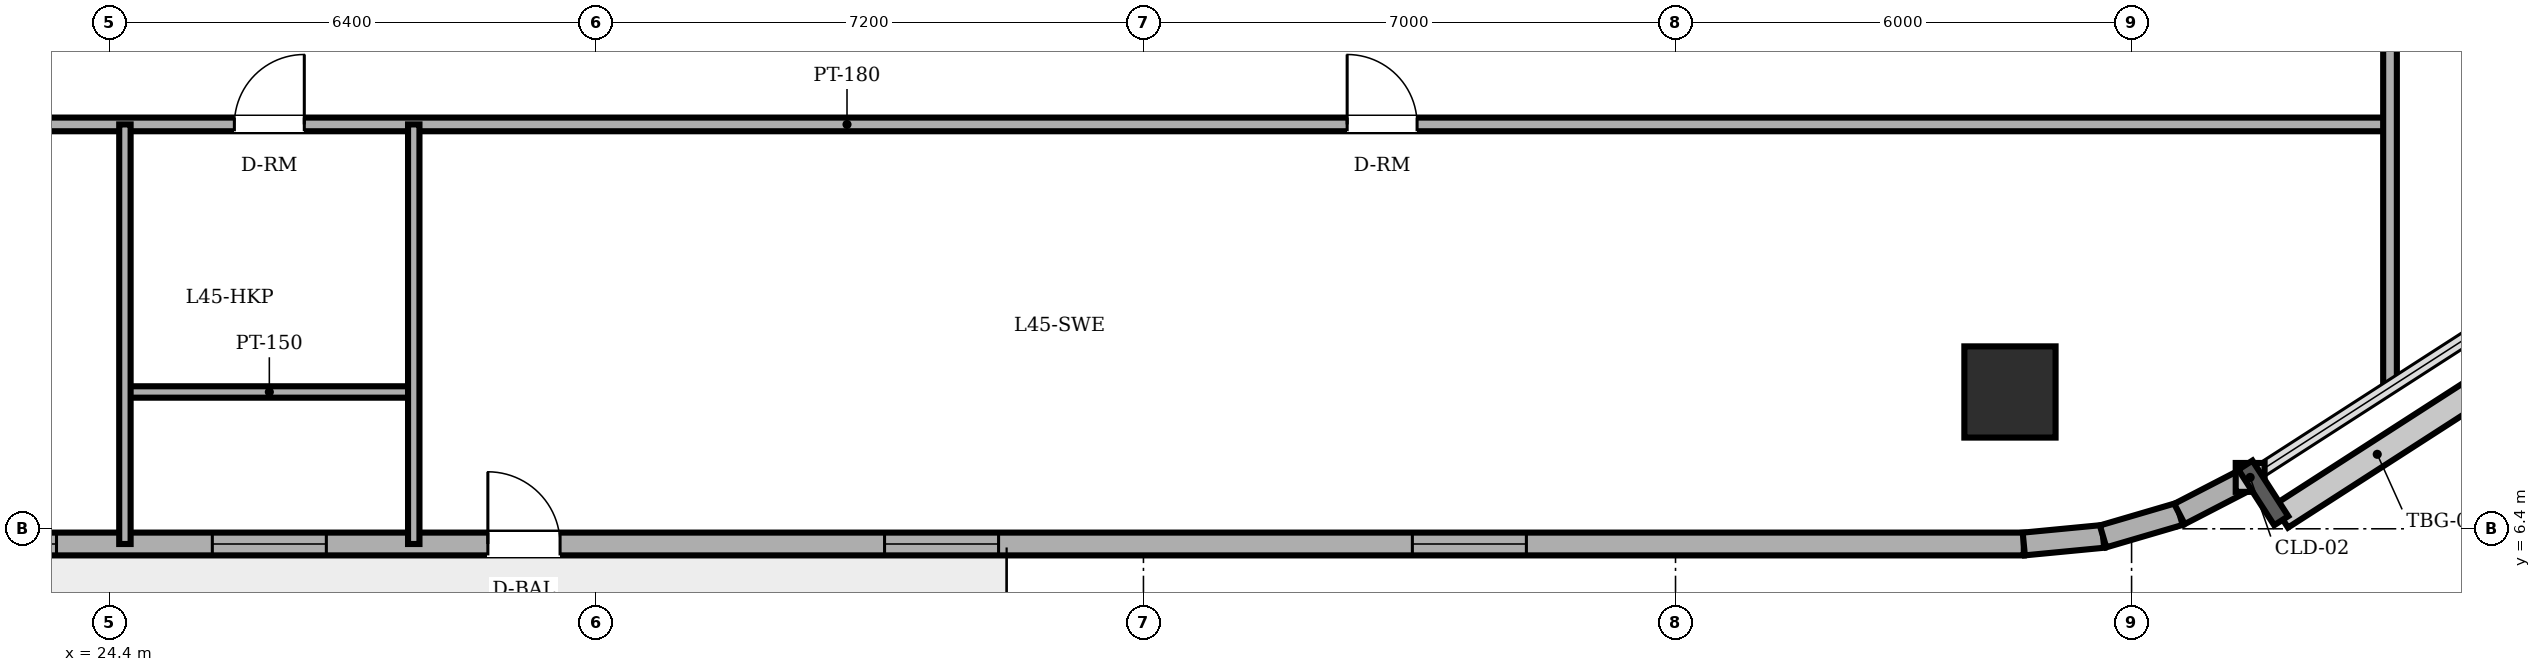
"""IFC4 building model, lengths in metres.
Left out: names, types, materials, properties, quantities, classifications, styles, units other than length and angle.
Written with IfcOpenShell. Run it as: python <this file> out.ifc"""

import sys

from ifc_helpers import new_model, si_unit, direction, frame, frame_2d, origin, origin_2d, place, context, subcontext, project, spatial, rectangle, circle, extrude, element, fill, save


model = new_model("IFC4")
c1 = context("Model", 3, precision=1e-05, world=origin(), true_north=direction((0.0, 1.0)))
c2 = subcontext(c1, "Body", "Model", "MODEL_VIEW")
j1 = project(units=[si_unit("LENGTHUNIT", "METRE"), si_unit("PLANEANGLEUNIT", "RADIAN")], contexts=[c1])
p1 = place(None, origin())
s1 = spatial("IfcSite", under=j1, at=p1, CompositionType="ELEMENT")
p2 = place(p1, origin())
s2 = spatial("IfcBuilding", under=s1, at=p2, CompositionType="ELEMENT")
p3 = place(p2, frame((0.0, 0.0, 172.6)))
s3 = spatial("IfcBuildingStorey", under=s2, at=p3, CompositionType="ELEMENT", Elevation=172.6)
p4 = place(p3, frame((49.4, 8.2, 0.0), z_axis=(0.0, 0.0, 1.0), x_axis=(1.0, 0.0, 0.0)))
e1 = element("IfcColumn", 1, at=p4, inside=s3, PredefinedType="COLUMN", context=c2, shape_type="SweptSolid", body=[
    extrude(circle(Radius=0.6, at=origin_2d()), origin(), (0.0, 0.0, 1.0), 3.6),
])
p5 = place(p3, frame((19.3, 6.2, 0.0), z_axis=(0.0, 0.0, 1.0), x_axis=(1.0, 0.0, 0.0)))
e2 = element("IfcWall", 2, at=p5, inside=s3, PredefinedType="SOLIDWALL", context=c2, shape_type="SweptSolid", body=[
    extrude(rectangle(XDim=30.282, YDim=0.3, at=frame_2d((15.141, 0.0))), origin(), (0.0, 0.0, 1.0), 3.4),
])
p6 = place(p5, frame((10.075, 0.0, 0.0)))
e3 = element("IfcOpeningElement", 3, at=p6, cuts=e2, PredefinedType="OPENING", context=c2, shape_type="SweptSolid", body=[
    extrude(rectangle(XDim=0.95, YDim=2.2, at=frame_2d((0.475, 1.1))), frame((0.0, 0.16, 0.0), z_axis=(0.0, -1.0, 0.0), x_axis=(1.0, 0.0, 0.0)), (0.0, 0.0, 1.0), 0.32),
])
p7 = place(p5, frame((1.25, 0.0, 0.85)))
e4 = element("IfcOpeningElement", 4, at=p7, cuts=e2, PredefinedType="OPENING", context=c2, shape_type="SweptSolid", body=[
    extrude(rectangle(XDim=1.5, YDim=1.55, at=frame_2d((0.75, 0.775))), frame((0.0, 0.16, 0.0), z_axis=(0.0, -1.0, 0.0), x_axis=(1.0, 0.0, 0.0)), (0.0, 0.0, 1.0), 0.32),
])
p8 = place(p5, frame((2.9, 0.0, 0.85)))
e5 = element("IfcOpeningElement", 5, at=p8, cuts=e2, PredefinedType="OPENING", context=c2, shape_type="SweptSolid", body=[
    extrude(rectangle(XDim=1.5, YDim=1.55, at=frame_2d((0.75, 0.775))), frame((0.0, 0.16, 0.0), z_axis=(0.0, -1.0, 0.0), x_axis=(1.0, 0.0, 0.0)), (0.0, 0.0, 1.0), 0.32),
])
p9 = place(p5, frame((6.45, 0.0, 0.85)))
e6 = element("IfcOpeningElement", 6, at=p9, cuts=e2, PredefinedType="OPENING", context=c2, shape_type="SweptSolid", body=[
    extrude(rectangle(XDim=1.5, YDim=1.55, at=frame_2d((0.75, 0.775))), frame((0.0, 0.16, 0.0), z_axis=(0.0, -1.0, 0.0), x_axis=(1.0, 0.0, 0.0)), (0.0, 0.0, 1.0), 0.32),
])
p10 = place(p5, frame((15.294, 0.0, 0.85)))
e7 = element("IfcOpeningElement", 7, at=p10, cuts=e2, PredefinedType="OPENING", context=c2, shape_type="SweptSolid", body=[
    extrude(rectangle(XDim=1.5, YDim=1.55, at=frame_2d((0.75, 0.775))), frame((0.0, 0.16, 0.0), z_axis=(0.0, -1.0, 0.0), x_axis=(1.0, 0.0, 0.0)), (0.0, 0.0, 1.0), 0.32),
])
p11 = place(p5, frame((22.238, 0.0, 0.85)))
e8 = element("IfcOpeningElement", 8, at=p11, cuts=e2, PredefinedType="OPENING", context=c2, shape_type="SweptSolid", body=[
    extrude(rectangle(XDim=1.5, YDim=1.55, at=frame_2d((0.75, 0.775))), frame((0.0, 0.16, 0.0), z_axis=(0.0, -1.0, 0.0), x_axis=(1.0, 0.0, 0.0)), (0.0, 0.0, 1.0), 0.32),
])
p12 = place(p3, frame((49.582, 6.2, 0.0), z_axis=(0.0, 0.0, 1.0), x_axis=(0.995426089968, 0.095534807324, 0.0)))
e9 = element("IfcWall", 9, at=p12, inside=s3, PredefinedType="SOLIDWALL", context=c2, shape_type="SweptSolid", body=[
    extrude(rectangle(XDim=1.048, YDim=0.3, at=frame_2d((0.524, 0.0))), origin(), (0.0, 0.0, 1.0), 3.4),
])
p13 = place(p3, frame((50.625, 6.3, 0.0), z_axis=(0.0, 0.0, 1.0), x_axis=(0.959528674476, 0.281610942363, 0.0)))
e10 = element("IfcWall", 10, at=p13, inside=s3, PredefinedType="SOLIDWALL", context=c2, shape_type="SweptSolid", body=[
    extrude(rectangle(XDim=1.047, YDim=0.3, at=frame_2d((0.524, 0.0))), origin(), (0.0, 0.0, 1.0), 3.4),
])
p14 = place(p3, frame((51.63, 6.595, 0.0), z_axis=(0.0, 0.0, 1.0), x_axis=(0.888283247196, 0.459296062198, 0.0)))
e11 = element("IfcWall", 11, at=p14, inside=s3, PredefinedType="SOLIDWALL", context=c2, shape_type="SweptSolid", body=[
    extrude(rectangle(XDim=1.047, YDim=0.3, at=frame_2d((0.523, 0.0))), origin(), (0.0, 0.0, 1.0), 3.4),
])
p15 = place(p3, frame((24.6, 8.2, 0.0), z_axis=(0.0, 0.0, 1.0), x_axis=(1.0, 0.0, 0.0)))
e12 = element("IfcWall", 12, at=p15, inside=s3, PredefinedType="PARTITIONING", context=c2, shape_type="SweptSolid", body=[
    extrude(rectangle(XDim=3.8, YDim=0.15, at=frame_2d((1.9, 0.0))), origin(), (0.0, 0.0, 1.0), 2.882),
])
p16 = place(p3, frame((13.8, 11.72, 0.0), z_axis=(0.0, 0.0, 1.0), x_axis=(1.0, 0.0, 0.0)))
e13 = element("IfcWall", 13, at=p16, inside=s3, PredefinedType="PARTITIONING", context=c2, shape_type="SweptSolid", body=[
    extrude(rectangle(XDim=40.6, YDim=0.18, at=frame_2d((20.3, 0.0))), origin(), (0.0, 0.0, 1.0), 3.4),
])
p17 = place(p16, frame((12.24, 0.0, 0.0)))
e14 = element("IfcOpeningElement", 14, at=p17, cuts=e13, PredefinedType="OPENING", context=c2, shape_type="SweptSolid", body=[
    extrude(rectangle(XDim=0.92, YDim=2.1, at=frame_2d((0.46, 1.05))), frame((0.0, 0.1, 0.0), z_axis=(0.0, -1.0, 0.0), x_axis=(1.0, 0.0, 0.0)), (0.0, 0.0, 1.0), 0.2),
])
p18 = place(p16, frame((5.54, 0.0, 0.0)))
e15 = element("IfcOpeningElement", 15, at=p18, cuts=e13, PredefinedType="OPENING", context=c2, shape_type="SweptSolid", body=[
    extrude(rectangle(XDim=0.92, YDim=2.1, at=frame_2d((0.46, 1.05))), frame((0.0, 0.1, 0.0), z_axis=(0.0, -1.0, 0.0), x_axis=(1.0, 0.0, 0.0)), (0.0, 0.0, 1.0), 0.2),
])
p19 = place(p16, frame((26.88, 0.0, 0.0)))
e16 = element("IfcOpeningElement", 16, at=p19, cuts=e13, PredefinedType="OPENING", context=c2, shape_type="SweptSolid", body=[
    extrude(rectangle(XDim=0.92, YDim=2.1, at=frame_2d((0.46, 1.05))), frame((0.0, 0.1, 0.0), z_axis=(0.0, -1.0, 0.0), x_axis=(1.0, 0.0, 0.0)), (0.0, 0.0, 1.0), 0.2),
])
for number, where, z_axis, x_axis in (
    (17, (24.6, 6.2, 0.0), (0.0, 0.0, 1.0), (0.0, 1.0, 0.0)),
    (18, (28.4, 6.2, 0.0), (0.0, 0.0, 1.0), (0.0, 1.0, 0.0)),
):
    element("IfcWall", number, at=place(p3, frame(where, z_axis=z_axis, x_axis=x_axis)), inside=s3, PredefinedType="PARTITIONING", context=c2, shape_type="SweptSolid", body=[
        extrude(rectangle(XDim=5.52, YDim=0.15, at=frame_2d((2.76, 0.0))), origin(), (0.0, 0.0, 1.0), 3.4),
    ])
p20 = place(p3, frame((54.4, 8.261, 0.0), z_axis=(0.0, 0.0, 1.0), x_axis=(0.0, 1.0, 0.0)))
e19 = element("IfcWall", 19, at=p20, inside=s3, PredefinedType="PARTITIONING", context=c2, shape_type="SweptSolid", body=[
    extrude(rectangle(XDim=22.089, YDim=0.18, at=frame_2d((11.044, 0.0))), origin(), (0.0, 0.0, 1.0), 3.4),
])
p21 = place(p20, frame((17.694, 0.0, 0.0)))
e20 = element("IfcOpeningElement", 20, at=p21, cuts=e19, PredefinedType="OPENING", context=c2, shape_type="SweptSolid", body=[
    extrude(rectangle(XDim=0.92, YDim=2.1, at=frame_2d((0.46, 1.05))), frame((0.0, 0.1, 0.0), z_axis=(0.0, -1.0, 0.0), x_axis=(1.0, 0.0, 0.0)), (0.0, 0.0, 1.0), 0.2),
])
p22 = place(p20, frame((10.771, 0.0, 0.0)))
e21 = element("IfcOpeningElement", 21, at=p22, cuts=e19, PredefinedType="OPENING", context=c2, shape_type="SweptSolid", body=[
    extrude(rectangle(XDim=0.92, YDim=2.1, at=frame_2d((0.46, 1.05))), frame((0.0, 0.1, 0.0), z_axis=(0.0, -1.0, 0.0), x_axis=(1.0, 0.0, 0.0)), (0.0, 0.0, 1.0), 0.2),
])
p23 = place(p6, origin())
e22 = element("IfcDoor", 22, at=p23, inside=s3, OperationType="SINGLE_SWING_LEFT", PredefinedType="DOOR", context=c2, shape_type="SweptSolid", body=[
    extrude(rectangle(XDim=0.95, YDim=2.2, at=frame_2d((0.475, 1.1))), frame((0.0, 0.025, 0.0), z_axis=(0.0, -1.0, 0.0), x_axis=(1.0, 0.0, 0.0)), (0.0, 0.0, 1.0), 0.05),
])
fill(e3, e22)
p24 = place(p8, origin())
e23 = element("IfcWindow", 23, at=p24, inside=s3, PartitioningType="DOUBLE_PANEL_VERTICAL", PredefinedType="WINDOW", context=c2, shape_type="SweptSolid", body=[
    extrude(rectangle(XDim=1.5, YDim=1.55, at=frame_2d((0.75, 0.775))), frame((0.0, 0.03, 0.0), z_axis=(0.0, -1.0, 0.0), x_axis=(1.0, 0.0, 0.0)), (0.0, 0.0, 1.0), 0.06),
])
fill(e5, e23)
p25 = place(p9, origin())
e24 = element("IfcWindow", 24, at=p25, inside=s3, PartitioningType="DOUBLE_PANEL_VERTICAL", PredefinedType="WINDOW", context=c2, shape_type="SweptSolid", body=[
    extrude(rectangle(XDim=1.5, YDim=1.55, at=frame_2d((0.75, 0.775))), frame((0.0, 0.03, 0.0), z_axis=(0.0, -1.0, 0.0), x_axis=(1.0, 0.0, 0.0)), (0.0, 0.0, 1.0), 0.06),
])
fill(e6, e24)
p26 = place(p10, origin())
e25 = element("IfcWindow", 25, at=p26, inside=s3, PartitioningType="DOUBLE_PANEL_VERTICAL", PredefinedType="WINDOW", context=c2, shape_type="SweptSolid", body=[
    extrude(rectangle(XDim=1.5, YDim=1.55, at=frame_2d((0.75, 0.775))), frame((0.0, 0.03, 0.0), z_axis=(0.0, -1.0, 0.0), x_axis=(1.0, 0.0, 0.0)), (0.0, 0.0, 1.0), 0.06),
])
fill(e7, e25)
p27 = place(p11, origin())
e26 = element("IfcWindow", 26, at=p27, inside=s3, PartitioningType="DOUBLE_PANEL_VERTICAL", PredefinedType="WINDOW", context=c2, shape_type="SweptSolid", body=[
    extrude(rectangle(XDim=1.5, YDim=1.55, at=frame_2d((0.75, 0.775))), frame((0.0, 0.03, 0.0), z_axis=(0.0, -1.0, 0.0), x_axis=(1.0, 0.0, 0.0)), (0.0, 0.0, 1.0), 0.06),
])
fill(e8, e26)
p28 = place(p17, origin())
e27 = element("IfcDoor", 27, at=p28, inside=s3, OperationType="SINGLE_SWING_RIGHT", PredefinedType="DOOR", context=c2, shape_type="SweptSolid", body=[
    extrude(rectangle(XDim=0.92, YDim=2.1, at=frame_2d((0.46, 1.05))), frame((0.0, 0.025, 0.0), z_axis=(0.0, -1.0, 0.0), x_axis=(1.0, 0.0, 0.0)), (0.0, 0.0, 1.0), 0.05),
])
fill(e14, e27)
p29 = place(p19, origin())
e28 = element("IfcDoor", 28, at=p29, inside=s3, OperationType="SINGLE_SWING_LEFT", PredefinedType="DOOR", context=c2, shape_type="SweptSolid", body=[
    extrude(rectangle(XDim=0.92, YDim=2.1, at=frame_2d((0.46, 1.05))), frame((0.0, 0.025, 0.0), z_axis=(0.0, -1.0, 0.0), x_axis=(1.0, 0.0, 0.0)), (0.0, 0.0, 1.0), 0.05),
])
fill(e16, e28)
save(model, sys.argv[1])
